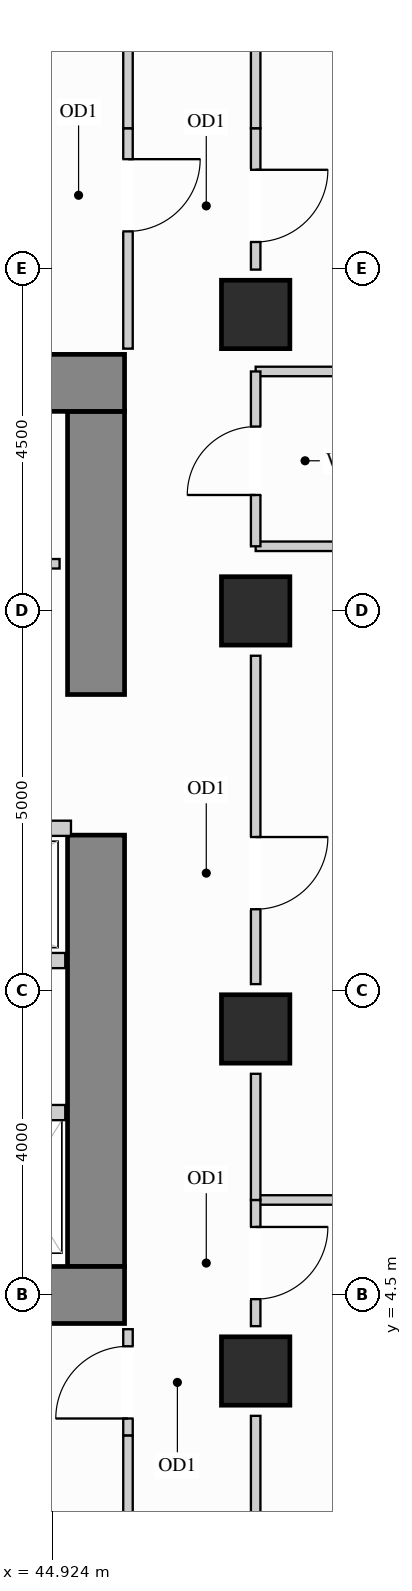
"""IFC4 building model, lengths in metres.
Left out: names, types, materials, properties, quantities, classifications, styles, units other than length and angle.
Written with IfcOpenShell. Run it as: python <this file> out.ifc"""

import sys

from ifc_helpers import new_model, si_unit, direction, frame, frame_2d, origin, origin_2d, place, context, subcontext, project, spatial, rectangle, extrude, source, transform, mapped, element, fill, save


model = new_model("IFC4")
c1 = context("Model", 3, precision=1e-05, world=origin(), true_north=direction((0.0, 1.0)))
c2 = subcontext(c1, "Body", "Model", "MODEL_VIEW")
j1 = project(units=[si_unit("LENGTHUNIT", "METRE"), si_unit("PLANEANGLEUNIT", "RADIAN")], contexts=[c1])
p1 = place(None, origin())
s1 = spatial("IfcSite", under=j1, at=p1, CompositionType="ELEMENT")
p2 = place(p1, origin())
s2 = spatial("IfcBuilding", under=s1, at=p2, CompositionType="ELEMENT")
p3 = place(p2, frame((0.0, 0.0, 84.6)))
s3 = spatial("IfcBuildingStorey", under=s2, at=p3, CompositionType="ELEMENT", Elevation=84.6)
m1 = source(origin(), c2, "Body", "SweptSolid", [
    extrude(rectangle(XDim=0.9, YDim=0.9, at=origin_2d()), origin(), (0.0, 0.0, 1.0), 3.38),
])
for number, where, z_axis, x_axis in (
    (1, (47.6, 13.5, 0.0), (0.0, 0.0, 1.0), (1.0, 0.0, 0.0)),
    (2, (47.6, 3.5, 0.0), (0.0, 0.0, 1.0), (1.0, 0.0, 0.0)),
    (3, (47.6, 8.0, 0.0), (0.0, 0.0, 1.0), (1.0, 0.0, 0.0)),
    (4, (47.6, 17.4, 0.0), (0.0, 0.0, 1.0), (1.0, 0.0, 0.0)),
):
    element("IfcColumn", number, at=place(p3, frame(where, z_axis=z_axis, x_axis=x_axis)), inside=s3, PredefinedType="COLUMN", context=c2, shape_type="MappedRepresentation", body=[
        mapped(m1, transform((0.0, 0.0, 0.0), x_axis=(1.0, 0.0, 0.0), y_axis=(0.0, 1.0, 0.0), z_axis=(0.0, 0.0, 1.0))),
    ])
m2 = source(origin(), c2, "Body", "SweptSolid", [
    extrude(rectangle(XDim=5.675, YDim=0.75, at=frame_2d((2.837, 0.0))), origin(), (0.0, 0.0, 1.0), 3.38),
])
p4 = place(p3, frame((45.5, 4.875, 0.0), z_axis=(0.0, 0.0, 1.0), x_axis=(0.0, 1.0, 0.0)))
e5 = element("IfcWall", 5, at=p4, inside=s3, PredefinedType="SHEAR", context=c2, shape_type="MappedRepresentation", body=[
    mapped(m2, transform((0.0, 0.0, 0.0), x_axis=(1.0, 0.0, 0.0), y_axis=(0.0, 1.0, 0.0), z_axis=(0.0, 0.0, 1.0))),
])
m3 = source(origin(), c2, "Body", "SweptSolid", [
    extrude(rectangle(XDim=3.725, YDim=0.75, at=frame_2d((1.863, 0.0))), origin(), (0.0, 0.0, 1.0), 3.38),
])
p5 = place(p3, frame((45.5, 12.4, 0.0), z_axis=(0.0, 0.0, 1.0), x_axis=(0.0, 1.0, 0.0)))
e6 = element("IfcWall", 6, at=p5, inside=s3, PredefinedType="SHEAR", context=c2, shape_type="MappedRepresentation", body=[
    mapped(m3, transform((0.0, 0.0, 0.0), x_axis=(1.0, 0.0, 0.0), y_axis=(0.0, 1.0, 0.0), z_axis=(0.0, 0.0, 1.0))),
])
m4 = source(origin(), c2, "Body", "SweptSolid", [
    extrude(rectangle(XDim=10.25, YDim=0.75, at=frame_2d((5.125, 0.0))), origin(), (0.0, 0.0, 1.0), 3.38),
])
for number, where, z_axis, x_axis in (
    (7, (35.625, 16.5, 0.0), (0.0, 0.0, 1.0), (1.0, 0.0, 0.0)),
    (8, (35.625, 4.5, 0.0), (0.0, 0.0, 1.0), (1.0, 0.0, 0.0)),
):
    element("IfcWall", number, at=place(p3, frame(where, z_axis=z_axis, x_axis=x_axis)), inside=s3, PredefinedType="SHEAR", context=c2, shape_type="MappedRepresentation", body=[
        mapped(m4, transform((0.0, 0.0, 0.0), x_axis=(1.0, 0.0, 0.0), y_axis=(0.0, 1.0, 0.0), z_axis=(0.0, 0.0, 1.0))),
    ])
p6 = place(p3, frame((40.75, 14.12, 0.0), z_axis=(0.0, 0.0, 1.0), x_axis=(1.0, 0.0, 0.0)))
e9 = element("IfcWall", 9, at=p6, inside=s3, PredefinedType="PARTITIONING", context=c2, shape_type="SweptSolid", body=[
    extrude(rectangle(XDim=4.27, YDim=0.125, at=frame_2d((2.135, 0.0))), origin(), (0.0, 0.0, 1.0), 3.365),
])
p7 = place(p6, frame((1.66, 0.0, 0.0)))
e10 = element("IfcOpeningElement", 10, at=p7, cuts=e9, PredefinedType="OPENING", context=c2, shape_type="SweptSolid", body=[
    extrude(rectangle(XDim=0.95, YDim=2.15, at=frame_2d((0.475, 1.075))), frame((0.0, 0.073, 0.0), z_axis=(0.0, -1.0, 0.0), x_axis=(1.0, 0.0, 0.0)), (0.0, 0.0, 1.0), 0.145),
])
m5 = source(origin(), c2, "Body", "SweptSolid", [
    extrude(rectangle(XDim=8.048, YDim=0.125, at=frame_2d((4.024, 0.0))), origin(), (0.0, 0.0, 1.0), 3.365),
])
p8 = place(p3, frame((47.6, 14.35, 0.0), z_axis=(0.0, 0.0, 1.0), x_axis=(1.0, 0.0, 0.0)))
e11 = element("IfcWall", 11, at=p8, inside=s3, PredefinedType="PARTITIONING", context=c2, shape_type="MappedRepresentation", body=[
    mapped(m5, transform((0.0, 0.0, 0.0), x_axis=(1.0, 0.0, 0.0), y_axis=(0.0, 1.0, 0.0), z_axis=(0.0, 0.0, 1.0))),
])
m6 = source(origin(), c2, "Body", "SweptSolid", [
    extrude(rectangle(XDim=8.048, YDim=0.125, at=frame_2d((4.024, 0.0))), origin(), (0.0, 0.0, 1.0), 2.677),
])
p9 = place(p3, frame((47.6, 16.65, 0.0), z_axis=(0.0, 0.0, 1.0), x_axis=(1.0, 0.0, 0.0)))
e12 = element("IfcWall", 12, at=p9, inside=s3, PredefinedType="PARTITIONING", context=c2, shape_type="MappedRepresentation", body=[
    mapped(m6, transform((0.0, 0.0, 0.0), x_axis=(1.0, 0.0, 0.0), y_axis=(0.0, 1.0, 0.0), z_axis=(0.0, 0.0, 1.0))),
])
p10 = place(p3, frame((47.6, 5.75, 0.0), z_axis=(0.0, 0.0, 1.0), x_axis=(1.0, 0.0, 0.0)))
e13 = element("IfcWall", 13, at=p10, inside=s3, PredefinedType="PARTITIONING", context=c2, shape_type="MappedRepresentation", body=[
    mapped(m5, transform((0.0, 0.0, 0.0), x_axis=(1.0, 0.0, 0.0), y_axis=(0.0, 1.0, 0.0), z_axis=(0.0, 0.0, 1.0))),
])
p11 = place(p3, frame((47.6, 4.09, 0.0), z_axis=(0.0, 0.0, 1.0), x_axis=(0.0, 1.0, 0.0)))
e14 = element("IfcWall", 14, at=p11, inside=s3, PredefinedType="PARTITIONING", context=c2, shape_type="SweptSolid", body=[
    extrude(rectangle(XDim=1.66, YDim=0.125, at=frame_2d((0.83, 0.0))), origin(), (0.0, 0.0, 1.0), 2.677),
])
p12 = place(p11, frame((0.355, 0.0, 0.0)))
e15 = element("IfcOpeningElement", 15, at=p12, cuts=e14, PredefinedType="OPENING", context=c2, shape_type="SweptSolid", body=[
    extrude(rectangle(XDim=0.95, YDim=2.15, at=frame_2d((0.475, 1.075))), frame((0.0, 0.073, 0.0), z_axis=(0.0, -1.0, 0.0), x_axis=(1.0, 0.0, 0.0)), (0.0, 0.0, 1.0), 0.145),
])
m7 = source(origin(), c2, "Body", "SweptSolid", [
    extrude(rectangle(XDim=1.72, YDim=0.125, at=frame_2d((0.86, 0.0))), origin(), (0.0, 0.0, 1.0), 2.677),
])
p13 = place(p3, frame((47.6, 1.19, 0.0), z_axis=(0.0, 0.0, 1.0), x_axis=(0.0, 1.0, 0.0)))
e16 = element("IfcWall", 16, at=p13, inside=s3, PredefinedType="PARTITIONING", context=c2, shape_type="MappedRepresentation", body=[
    mapped(m7, transform((0.0, 0.0, 0.0), x_axis=(1.0, 0.0, 0.0), y_axis=(0.0, 1.0, 0.0), z_axis=(0.0, 0.0, 1.0))),
])
m8 = source(origin(), c2, "Body", "SweptSolid", [
    extrude(rectangle(XDim=1.66, YDim=0.125, at=frame_2d((0.83, 0.0))), origin(), (0.0, 0.0, 1.0), 2.677),
])
p14 = place(p3, frame((47.6, 5.75, 0.0), z_axis=(0.0, 0.0, 1.0), x_axis=(0.0, 1.0, 0.0)))
e17 = element("IfcWall", 17, at=p14, inside=s3, PredefinedType="PARTITIONING", context=c2, shape_type="MappedRepresentation", body=[
    mapped(m8, transform((0.0, 0.0, 0.0), x_axis=(1.0, 0.0, 0.0), y_axis=(0.0, 1.0, 0.0), z_axis=(0.0, 0.0, 1.0))),
])
p15 = place(p3, frame((47.6, 8.59, 0.0), z_axis=(0.0, 0.0, 1.0), x_axis=(0.0, 1.0, 0.0)))
e18 = element("IfcWall", 18, at=p15, inside=s3, PredefinedType="PARTITIONING", context=c2, shape_type="SweptSolid", body=[
    extrude(rectangle(XDim=4.32, YDim=0.125, at=frame_2d((2.16, 0.0))), origin(), (0.0, 0.0, 1.0), 2.677),
])
p16 = place(p15, frame((0.985, 0.0, 0.0)))
e19 = element("IfcOpeningElement", 19, at=p16, cuts=e18, PredefinedType="OPENING", context=c2, shape_type="SweptSolid", body=[
    extrude(rectangle(XDim=0.95, YDim=2.15, at=frame_2d((0.475, 1.075))), frame((0.0, 0.073, 0.0), z_axis=(0.0, -1.0, 0.0), x_axis=(1.0, 0.0, 0.0)), (0.0, 0.0, 1.0), 0.145),
])
p17 = place(p3, frame((47.6, 17.99, 0.0), z_axis=(0.0, 0.0, 1.0), x_axis=(0.0, 1.0, 0.0)))
e20 = element("IfcWall", 20, at=p17, inside=s3, PredefinedType="PARTITIONING", context=c2, shape_type="SweptSolid", body=[
    extrude(rectangle(XDim=1.86, YDim=0.125, at=frame_2d((0.93, 0.0))), origin(), (0.0, 0.0, 1.0), 2.677),
])
p18 = place(p17, frame((0.363, 0.0, 0.0)))
e21 = element("IfcOpeningElement", 21, at=p18, cuts=e20, PredefinedType="OPENING", context=c2, shape_type="SweptSolid", body=[
    extrude(rectangle(XDim=0.95, YDim=2.15, at=frame_2d((0.475, 1.075))), frame((0.0, 0.073, 0.0), z_axis=(0.0, -1.0, 0.0), x_axis=(1.0, 0.0, 0.0)), (0.0, 0.0, 1.0), 0.145),
])
m9 = source(origin(), c2, "Body", "SweptSolid", [
    extrude(rectangle(XDim=1.46, YDim=0.125, at=frame_2d((0.73, 0.0))), origin(), (0.0, 0.0, 1.0), 2.677),
])
p19 = place(p3, frame((47.6, 19.85, 0.0), z_axis=(0.0, 0.0, 1.0), x_axis=(0.0, 1.0, 0.0)))
e22 = element("IfcWall", 22, at=p19, inside=s3, PredefinedType="PARTITIONING", context=c2, shape_type="MappedRepresentation", body=[
    mapped(m9, transform((0.0, 0.0, 0.0), x_axis=(1.0, 0.0, 0.0), y_axis=(0.0, 1.0, 0.0), z_axis=(0.0, 0.0, 1.0))),
])
p20 = place(p3, frame((47.6, 14.35, 0.0), z_axis=(0.0, 0.0, 1.0), x_axis=(0.0, 1.0, 0.0)))
e23 = element("IfcWall", 23, at=p20, inside=s3, PredefinedType="PARTITIONING", context=c2, shape_type="SweptSolid", body=[
    extrude(rectangle(XDim=2.3, YDim=0.125, at=frame_2d((1.15, 0.0))), origin(), (0.0, 0.0, 1.0), 2.677),
])
p21 = place(p20, frame((0.675, 0.0, 0.0)))
e24 = element("IfcOpeningElement", 24, at=p21, cuts=e23, PredefinedType="OPENING", context=c2, shape_type="SweptSolid", body=[
    extrude(rectangle(XDim=0.9, YDim=2.15, at=frame_2d((0.45, 1.075))), frame((0.0, 0.073, 0.0), z_axis=(0.0, -1.0, 0.0), x_axis=(1.0, 0.0, 0.0)), (0.0, 0.0, 1.0), 0.145),
])
p22 = place(p3, frame((45.92, 16.95, 0.0), z_axis=(0.0, 0.0, 1.0), x_axis=(0.0, 1.0, 0.0)))
e25 = element("IfcWall", 25, at=p22, inside=s3, PredefinedType="PARTITIONING", context=c2, shape_type="SweptSolid", body=[
    extrude(rectangle(XDim=2.9, YDim=0.125, at=frame_2d((1.45, 0.0))), origin(), (0.0, 0.0, 1.0), 3.365),
])
p23 = place(p22, frame((1.543, 0.0, 0.0)))
e26 = element("IfcOpeningElement", 26, at=p23, cuts=e25, PredefinedType="OPENING", context=c2, shape_type="SweptSolid", body=[
    extrude(rectangle(XDim=0.95, YDim=2.15, at=frame_2d((0.475, 1.075))), frame((0.0, 0.073, 0.0), z_axis=(0.0, -1.0, 0.0), x_axis=(1.0, 0.0, 0.0)), (0.0, 0.0, 1.0), 0.145),
])
m10 = source(origin(), c2, "Body", "SweptSolid", [
    extrude(rectangle(XDim=2.298, YDim=0.125, at=frame_2d((1.149, 0.0))), origin(), (0.0, 0.0, 1.0), 3.365),
])
p24 = place(p3, frame((45.92, 19.85, 0.0), z_axis=(0.0, 0.0, 1.0), x_axis=(0.0, 1.0, 0.0)))
e27 = element("IfcWall", 27, at=p24, inside=s3, PredefinedType="PARTITIONING", context=c2, shape_type="MappedRepresentation", body=[
    mapped(m10, transform((0.0, 0.0, 0.0), x_axis=(1.0, 0.0, 0.0), y_axis=(0.0, 1.0, 0.0), z_axis=(0.0, 0.0, 1.0))),
])
p25 = place(p3, frame((45.92, 2.65, 0.0), z_axis=(0.0, 0.0, 1.0), x_axis=(0.0, 1.0, 0.0)))
e28 = element("IfcWall", 28, at=p25, inside=s3, PredefinedType="PARTITIONING", context=c2, shape_type="SweptSolid", body=[
    extrude(rectangle(XDim=1.4, YDim=0.125, at=frame_2d((0.7, 0.0))), origin(), (0.0, 0.0, 1.0), 3.365),
])
p26 = place(p25, frame((0.225, 0.0, 0.0)))
e29 = element("IfcOpeningElement", 29, at=p26, cuts=e28, PredefinedType="OPENING", context=c2, shape_type="SweptSolid", body=[
    extrude(rectangle(XDim=0.95, YDim=2.15, at=frame_2d((0.475, 1.075))), frame((0.0, 0.073, 0.0), z_axis=(0.0, -1.0, 0.0), x_axis=(1.0, 0.0, 0.0)), (0.0, 0.0, 1.0), 0.145),
])
p27 = place(p3, frame((45.92, 0.352, 0.0), z_axis=(0.0, 0.0, 1.0), x_axis=(0.0, 1.0, 0.0)))
e30 = element("IfcWall", 30, at=p27, inside=s3, PredefinedType="PARTITIONING", context=c2, shape_type="MappedRepresentation", body=[
    mapped(m10, transform((0.0, 0.0, 0.0), x_axis=(1.0, 0.0, 0.0), y_axis=(0.0, 1.0, 0.0), z_axis=(0.0, 0.0, 1.0))),
])
m11 = source(origin(), c2, "Body", "SweptSolid", [
    extrude(rectangle(XDim=1.245, YDim=0.2, at=frame_2d((0.623, 0.0))), origin(), (0.0, 0.0, 1.0), 3.365),
])
p28 = place(p3, frame((43.85, 6.9, 0.0), z_axis=(0.0, 0.0, 1.0), x_axis=(1.0, 0.0, 0.0)))
e31 = element("IfcWall", 31, at=p28, inside=s3, PredefinedType="PARTITIONING", context=c2, shape_type="MappedRepresentation", body=[
    mapped(m11, transform((0.0, 0.0, 0.0), x_axis=(1.0, 0.0, 0.0), y_axis=(0.0, 1.0, 0.0), z_axis=(0.0, 0.0, 1.0))),
])
m12 = source(origin(), c2, "Body", "SweptSolid", [
    extrude(rectangle(XDim=3.49, YDim=0.2, at=frame_2d((1.745, 0.0))), origin(), (0.0, 0.0, 1.0), 3.365),
])
p29 = place(p3, frame((41.68, 10.64, 0.0), z_axis=(0.0, 0.0, 1.0), x_axis=(1.0, 0.0, 0.0)))
e32 = element("IfcWall", 32, at=p29, inside=s3, PredefinedType="PARTITIONING", context=c2, shape_type="MappedRepresentation", body=[
    mapped(m12, transform((0.0, 0.0, 0.0), x_axis=(1.0, 0.0, 0.0), y_axis=(0.0, 1.0, 0.0), z_axis=(0.0, 0.0, 1.0))),
])
m13 = source(origin(), c2, "Body", "SweptSolid", [
    extrude(rectangle(XDim=3.415, YDim=0.2, at=frame_2d((1.708, 0.0))), origin(), (0.0, 0.0, 1.0), 3.365),
])
p30 = place(p3, frame((41.68, 8.9, 0.0), z_axis=(0.0, 0.0, 1.0), x_axis=(1.0, 0.0, 0.0)))
e33 = element("IfcWall", 33, at=p30, inside=s3, PredefinedType="PARTITIONING", context=c2, shape_type="MappedRepresentation", body=[
    mapped(m13, transform((0.0, 0.0, 0.0), x_axis=(1.0, 0.0, 0.0), y_axis=(0.0, 1.0, 0.0), z_axis=(0.0, 0.0, 1.0))),
])
m14 = source(origin(), c2, "Body", "SweptSolid", [
    extrude(rectangle(XDim=0.95, YDim=2.15, at=frame_2d((0.475, 1.075))), frame((0.0, 0.025, 0.0), z_axis=(0.0, -1.0, 0.0), x_axis=(1.0, 0.0, 0.0)), (0.0, 0.0, 1.0), 0.05),
])
p31 = place(p23, origin())
e34 = element("IfcDoor", 34, at=p31, inside=s3, OperationType="SINGLE_SWING_RIGHT", PredefinedType="DOOR", context=c2, shape_type="MappedRepresentation", body=[
    mapped(m14, transform((0.0, 0.0, 0.0), x_axis=(1.0, 0.0, 0.0), y_axis=(0.0, 1.0, 0.0), z_axis=(0.0, 0.0, 1.0))),
])
fill(e26, e34)
p32 = place(p26, origin())
e35 = element("IfcDoor", 35, at=p32, inside=s3, OperationType="SINGLE_SWING_LEFT", PredefinedType="DOOR", context=c2, shape_type="MappedRepresentation", body=[
    mapped(m14, transform((0.0, 0.0, 0.0), x_axis=(1.0, 0.0, 0.0), y_axis=(0.0, 1.0, 0.0), z_axis=(0.0, 0.0, 1.0))),
])
fill(e29, e35)
p33 = place(p12, origin())
e36 = element("IfcDoor", 36, at=p33, inside=s3, OperationType="SINGLE_SWING_RIGHT", PredefinedType="DOOR", context=c2, shape_type="MappedRepresentation", body=[
    mapped(m14, transform((0.0, 0.0, 0.0), x_axis=(1.0, 0.0, 0.0), y_axis=(0.0, 1.0, 0.0), z_axis=(0.0, 0.0, 1.0))),
])
fill(e15, e36)
p34 = place(p16, origin())
e37 = element("IfcDoor", 37, at=p34, inside=s3, OperationType="SINGLE_SWING_RIGHT", PredefinedType="DOOR", context=c2, shape_type="MappedRepresentation", body=[
    mapped(m14, transform((0.0, 0.0, 0.0), x_axis=(1.0, 0.0, 0.0), y_axis=(0.0, 1.0, 0.0), z_axis=(0.0, 0.0, 1.0))),
])
fill(e19, e37)
p35 = place(p18, origin())
e38 = element("IfcDoor", 38, at=p35, inside=s3, OperationType="SINGLE_SWING_RIGHT", PredefinedType="DOOR", context=c2, shape_type="MappedRepresentation", body=[
    mapped(m14, transform((0.0, 0.0, 0.0), x_axis=(1.0, 0.0, 0.0), y_axis=(0.0, 1.0, 0.0), z_axis=(0.0, 0.0, 1.0))),
])
fill(e21, e38)
m15 = source(origin(), c2, "Body", "SweptSolid", [
    extrude(rectangle(XDim=0.9, YDim=2.15, at=frame_2d((0.45, 1.075))), frame((0.0, 0.025, 0.0), z_axis=(0.0, -1.0, 0.0), x_axis=(1.0, 0.0, 0.0)), (0.0, 0.0, 1.0), 0.05),
])
p36 = place(p21, origin())
e39 = element("IfcDoor", 39, at=p36, inside=s3, OperationType="SINGLE_SWING_LEFT", PredefinedType="DOOR", context=c2, shape_type="MappedRepresentation", body=[
    mapped(m15, transform((0.0, 0.0, 0.0), x_axis=(1.0, 0.0, 0.0), y_axis=(0.0, 1.0, 0.0), z_axis=(0.0, 0.0, 1.0))),
])
fill(e24, e39)
save(model, sys.argv[1])
